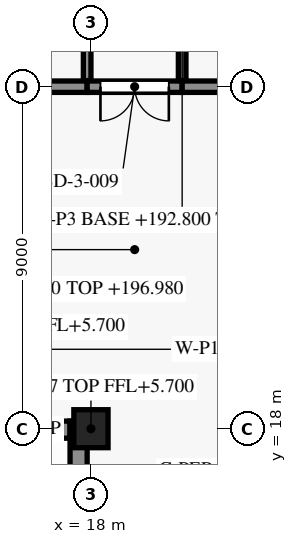
"""IFC4 building model, lengths in metres.
Left out: names, types, materials, properties, quantities, classifications, styles, units other than length and angle.
Written with IfcOpenShell. Run it as: python <this file> out.ifc"""

import sys

from ifc_helpers import new_model, si_unit, direction, frame, frame_2d, origin, origin_2d, place, context, subcontext, project, spatial, rectangle, extrude, element, fill, save


model = new_model("IFC4")
c1 = context("Model", 3, precision=1e-05, world=origin(), true_north=direction((0.0, 1.0)))
c2 = subcontext(c1, "Body", "Model", "MODEL_VIEW")
j1 = project(units=[si_unit("LENGTHUNIT", "METRE"), si_unit("PLANEANGLEUNIT", "RADIAN")], contexts=[c1])
p1 = place(None, origin())
s1 = spatial("IfcSite", under=j1, at=p1, CompositionType="ELEMENT")
p2 = place(p1, origin())
s2 = spatial("IfcBuilding", under=s1, at=p2, CompositionType="ELEMENT")
p3 = place(p2, frame((0.0, 0.0, 192.8)))
s3 = spatial("IfcBuildingStorey", under=s2, at=p3, CompositionType="ELEMENT", Elevation=192.8)
p4 = place(p3, frame((14.15, 17.975, 0.0), z_axis=(0.0, 0.0, 1.0), x_axis=(1.0, 0.0, 0.0)))
e1 = element("IfcWall", 1, at=p4, inside=s3, PredefinedType="SHEAR", context=c2, shape_type="SweptSolid", body=[
    extrude(rectangle(XDim=3.3, YDim=0.45, at=frame_2d((1.65, 0.0))), origin(), (0.0, 0.0, 1.0), 5.7),
])
p5 = place(p3, frame((17.675, 9.55, 0.0), z_axis=(0.0, 0.0, 1.0), x_axis=(0.0, 1.0, 0.0)))
e2 = element("IfcWall", 2, at=p5, inside=s3, PredefinedType="SHEAR", context=c2, shape_type="SweptSolid", body=[
    extrude(rectangle(XDim=8.65, YDim=0.45, at=frame_2d((4.325, 0.0))), origin(), (0.0, 0.0, 1.0), 5.7),
])
p6 = place(p5, frame((0.85, 0.0, 0.0)))
e3 = element("IfcOpeningElement", 3, at=p6, cuts=e2, PredefinedType="OPENING", context=c2, shape_type="SweptSolid", body=[
    extrude(rectangle(XDim=1.2, YDim=2.2, at=frame_2d((0.6, 1.1))), frame((0.0, 0.235, 0.0), z_axis=(0.0, -1.0, 0.0), x_axis=(1.0, 0.0, 0.0)), (0.0, 0.0, 1.0), 0.47),
])
p7 = place(p3, frame((17.9, 27.0, 0.0), z_axis=(0.0, 0.0, 1.0), x_axis=(-1.0, 0.0, 0.0)))
e4 = element("IfcWall", 4, at=p7, inside=s3, PredefinedType="PARTITIONING", context=c2, shape_type="SweptSolid", body=[
    extrude(rectangle(XDim=3.9, YDim=0.3, at=frame_2d((1.95, 0.0))), origin(), (0.0, 0.0, 1.0), 5.08),
])
p8 = place(p3, frame((20.4, 27.0, 0.0), z_axis=(0.0, 0.0, 1.0), x_axis=(-1.0, 0.0, 0.0)))
e5 = element("IfcWall", 5, at=p8, inside=s3, PredefinedType="PARTITIONING", context=c2, shape_type="SweptSolid", body=[
    extrude(rectangle(XDim=2.5, YDim=0.3, at=frame_2d((1.25, 0.0))), origin(), (0.0, 0.0, 1.0), 5.08),
])
p9 = place(p8, frame((0.35, 0.0, 0.0)))
e6 = element("IfcOpeningElement", 6, at=p9, cuts=e5, PredefinedType="OPENING", context=c2, shape_type="SweptSolid", body=[
    extrude(rectangle(XDim=1.8, YDim=2.1, at=frame_2d((0.9, 1.05))), frame((0.0, 0.16, 0.0), z_axis=(0.0, -1.0, 0.0), x_axis=(1.0, 0.0, 0.0)), (0.0, 0.0, 1.0), 0.32),
])
p10 = place(p3, frame((23.445, 27.0, 0.0), z_axis=(0.0, 0.0, 1.0), x_axis=(-1.0, 0.0, 0.0)))
e7 = element("IfcWall", 7, at=p10, inside=s3, PredefinedType="PARTITIONING", context=c2, shape_type="SweptSolid", body=[
    extrude(rectangle(XDim=3.045, YDim=0.3, at=frame_2d((1.522, 0.0))), origin(), (0.0, 0.0, 1.0), 5.08),
])
p11 = place(p3, frame((17.9, 27.16, 0.0), z_axis=(0.0, 0.0, 1.0), x_axis=(0.0, 1.0, 0.0)))
e8 = element("IfcWall", 8, at=p11, inside=s3, PredefinedType="PARTITIONING", context=c2, shape_type="SweptSolid", body=[
    extrude(rectangle(XDim=6.24, YDim=0.2, at=frame_2d((3.12, 0.0))), origin(), (0.0, 0.0, 1.0), 5.08),
])
p12 = place(p11, frame((2.59, 0.0, 0.0)))
e9 = element("IfcOpeningElement", 9, at=p12, cuts=e8, PredefinedType="OPENING", context=c2, shape_type="SweptSolid", body=[
    extrude(rectangle(XDim=1.0, YDim=2.1, at=frame_2d((0.5, 1.05))), frame((0.0, 0.11, 0.0), z_axis=(0.0, -1.0, 0.0), x_axis=(1.0, 0.0, 0.0)), (0.0, 0.0, 1.0), 0.22),
])
p13 = place(p3, frame((20.4, 33.4, 0.0), z_axis=(0.0, 0.0, 1.0), x_axis=(0.0, -1.0, 0.0)))
e10 = element("IfcWall", 10, at=p13, inside=s3, PredefinedType="PARTITIONING", context=c2, shape_type="SweptSolid", body=[
    extrude(rectangle(XDim=6.24, YDim=0.2, at=frame_2d((3.12, 0.0))), origin(), (0.0, 0.0, 1.0), 5.08),
])
p14 = place(p13, frame((2.65, 0.0, 0.0)))
e11 = element("IfcOpeningElement", 11, at=p14, cuts=e10, PredefinedType="OPENING", context=c2, shape_type="SweptSolid", body=[
    extrude(rectangle(XDim=1.0, YDim=2.1, at=frame_2d((0.5, 1.05))), frame((0.0, 0.11, 0.0), z_axis=(0.0, -1.0, 0.0), x_axis=(1.0, 0.0, 0.0)), (0.0, 0.0, 1.0), 0.22),
])
p15 = place(p3, frame((18.0, 18.0, 0.0), z_axis=(0.0, 0.0, 1.0), x_axis=(1.0, 0.0, 0.0)))
e12 = element("IfcColumn", 12, at=p15, inside=s3, PredefinedType="COLUMN", context=c2, shape_type="SweptSolid", body=[
    extrude(rectangle(XDim=0.9, YDim=1.0, at=origin_2d()), origin(), (0.0, 0.0, 1.0), 5.7),
])
p16 = place(p9, origin())
e13 = element("IfcDoor", 13, at=p16, inside=s3, OperationType="DOUBLE_DOOR_SINGLE_SWING", PredefinedType="DOOR", context=c2, shape_type="SweptSolid", body=[
    extrude(rectangle(XDim=1.8, YDim=2.1, at=frame_2d((0.9, 1.05))), frame((0.0, 0.025, 0.0), z_axis=(0.0, -1.0, 0.0), x_axis=(1.0, 0.0, 0.0)), (0.0, 0.0, 1.0), 0.05),
])
fill(e6, e13)
save(model, sys.argv[1])
